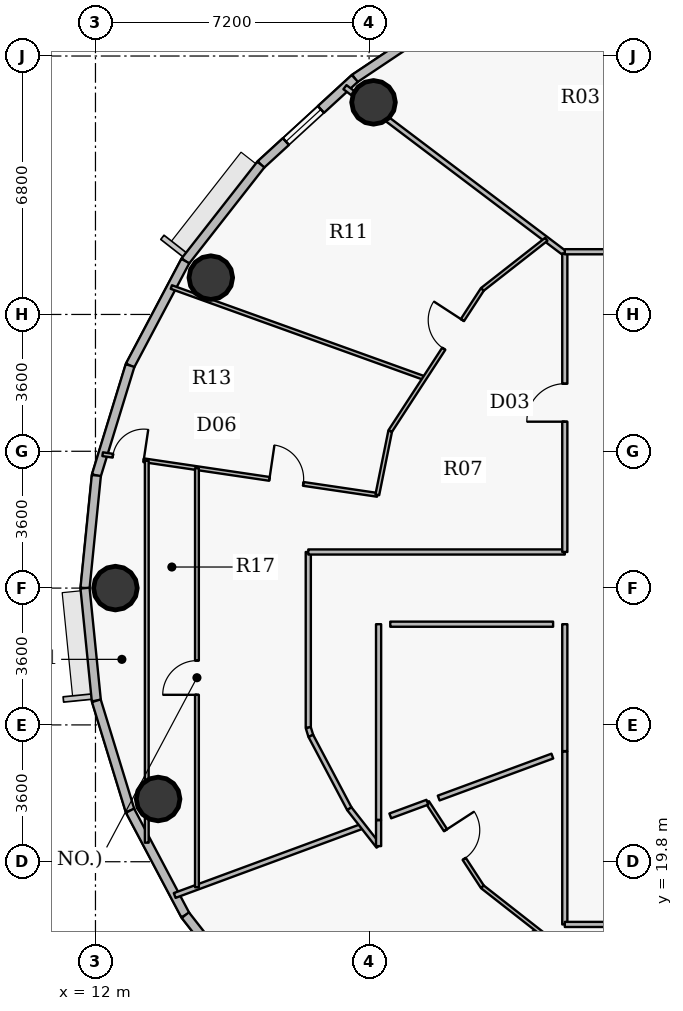
"""IFC4 building model, lengths in metres.
Left out: names, types, materials, properties, quantities, classifications, styles, units other than length and angle.
Written with IfcOpenShell. Run it as: python <this file> out.ifc"""

import sys

from ifc_helpers import new_model, si_unit, direction, frame, frame_2d, origin, origin_2d, place, context, subcontext, project, spatial, rectangle, hollow_circle, extrude, source, transform, mapped, element, fill, save


model = new_model("IFC4")
c1 = context("Model", 3, precision=1e-05, world=origin(), true_north=direction((0.0, 1.0)))
c2 = subcontext(c1, "Body", "Model", "MODEL_VIEW")
j1 = project(units=[si_unit("LENGTHUNIT", "METRE"), si_unit("PLANEANGLEUNIT", "RADIAN")], contexts=[c1])
p1 = place(None, origin())
s1 = spatial("IfcSite", under=j1, at=p1, CompositionType="ELEMENT")
p2 = place(p1, origin())
s2 = spatial("IfcBuilding", under=s1, at=p2, CompositionType="ELEMENT")
p3 = place(p2, frame((0.0, 0.0, 217.8)))
s3 = spatial("IfcBuildingStorey", under=s2, at=p3, CompositionType="ELEMENT", Elevation=217.8)
for number, where, z_axis, x_axis in (
    (1, (19.317, 39.781, 0.0), (0.0, 0.0, 1.0), (1.0, 0.0, 0.0)),
    (2, (15.035, 35.169, 0.0), (0.0, 0.0, 1.0), (1.0, 0.0, 0.0)),
    (3, (12.525, 27.0, 0.0), (0.0, 0.0, 1.0), (1.0, 0.0, 0.0)),
    (4, (13.649, 21.451, 0.0), (0.0, 0.0, 1.0), (1.0, 0.0, 0.0)),
):
    element("IfcColumn", number, at=place(p3, frame(where, z_axis=z_axis, x_axis=x_axis)), inside=s3, PredefinedType="COLUMN", context=c2, shape_type="SweptSolid", body=[
        extrude(hollow_circle(Radius=0.575, WallThickness=0.036, at=origin_2d()), origin(), (0.0, 0.0, 1.0), 3.75),
    ])
p4 = place(p3, frame((18.824, 40.411, 0.0), z_axis=(0.0, 0.0, 1.0), x_axis=(0.831262496074, 0.555880079352, 0.0)))
e5 = element("IfcWall", 5, at=p4, inside=s3, PredefinedType="SOLIDWALL", context=c2, shape_type="SweptSolid", body=[
    extrude(rectangle(XDim=3.484, YDim=0.24, at=frame_2d((1.742, 0.0))), origin(), (0.0, 0.0, 1.0), 3.5),
])
p5 = place(p3, frame((16.352, 38.145, 0.0), z_axis=(0.0, 0.0, 1.0), x_axis=(0.737123922599, 0.675757591694, 0.0)))
e6 = element("IfcWall", 6, at=p5, inside=s3, PredefinedType="SOLIDWALL", context=c2, shape_type="SweptSolid", body=[
    extrude(rectangle(XDim=3.354, YDim=0.24, at=frame_2d((1.677, 0.0))), origin(), (0.0, 0.0, 1.0), 3.5),
])
p6 = place(p5, frame((0.896, 0.0, 0.9)))
e7 = element("IfcOpeningElement", 7, at=p6, cuts=e6, PredefinedType="OPENING", context=c2, shape_type="SweptSolid", body=[
    extrude(rectangle(XDim=1.25, YDim=1.65, at=origin_2d()), frame((0.625, 0.13, 0.825), z_axis=(0.0, -1.0, 0.0), x_axis=(1.0, 0.0, 0.0)), (0.0, 0.0, 1.0), 0.26),
])
p7 = place(p3, frame((14.364, 35.605, 0.0), z_axis=(0.0, 0.0, 1.0), x_axis=(0.616312344705, 0.787501805562, 0.0)))
e8 = element("IfcWall", 8, at=p7, inside=s3, PredefinedType="SOLIDWALL", context=c2, shape_type="SweptSolid", body=[
    extrude(rectangle(XDim=3.225, YDim=0.24, at=frame_2d((1.612, 0.0))), origin(), (0.0, 0.0, 1.0), 3.5),
])
p8 = place(p3, frame((12.91, 32.856, 0.0), z_axis=(0.0, 0.0, 1.0), x_axis=(0.46766049993, 0.883908172157, 0.0)))
e9 = element("IfcWall", 9, at=p8, inside=s3, PredefinedType="SOLIDWALL", context=c2, shape_type="SweptSolid", body=[
    extrude(rectangle(XDim=3.11, YDim=0.24, at=frame_2d((1.555, 0.0))), origin(), (0.0, 0.0, 1.0), 3.5),
])
p9 = place(p3, frame((12.023, 29.964, 0.0), z_axis=(0.0, 0.0, 1.0), x_axis=(0.293132907334, 0.95607170162, 0.0)))
e10 = element("IfcWall", 10, at=p9, inside=s3, PredefinedType="SOLIDWALL", context=c2, shape_type="SweptSolid", body=[
    extrude(rectangle(XDim=3.025, YDim=0.24, at=frame_2d((1.512, 0.0))), origin(), (0.0, 0.0, 1.0), 3.5),
])
for number, where, z_axis, x_axis in (
    (11, (11.725, 27.0, 0.0), (0.0, 0.0, 1.0), (0.1, 0.995, 0.0)),
    (12, (12.023, 24.036, 0.0), (0.0, 0.0, 1.0), (-0.1, 0.995, 0.0)),
):
    element("IfcWall", number, at=place(p3, frame(where, z_axis=z_axis, x_axis=x_axis)), inside=s3, PredefinedType="SOLIDWALL", context=c2, shape_type="SweptSolid", body=[
        extrude(rectangle(XDim=2.979, YDim=0.24, at=frame_2d((1.489, 0.0))), origin(), (0.0, 0.0, 1.0), 3.5),
    ])
p10 = place(p3, frame((12.91, 21.144, 0.0), z_axis=(0.0, 0.0, 1.0), x_axis=(-0.293132907334, 0.95607170162, 0.0)))
e13 = element("IfcWall", 13, at=p10, inside=s3, PredefinedType="SOLIDWALL", context=c2, shape_type="SweptSolid", body=[
    extrude(rectangle(XDim=3.025, YDim=0.24, at=frame_2d((1.512, 0.0))), origin(), (0.0, 0.0, 1.0), 3.5),
])
p11 = place(p3, frame((14.364, 18.395, 0.0), z_axis=(0.0, 0.0, 1.0), x_axis=(-0.46766049993, 0.883908172157, 0.0)))
e14 = element("IfcWall", 14, at=p11, inside=s3, PredefinedType="SOLIDWALL", context=c2, shape_type="SweptSolid", body=[
    extrude(rectangle(XDim=3.11, YDim=0.24, at=frame_2d((1.555, 0.0))), origin(), (0.0, 0.0, 1.0), 3.5),
])
p12 = place(p3, frame((16.352, 15.855, 0.0), z_axis=(0.0, 0.0, 1.0), x_axis=(-0.616312344705, 0.787501805562, 0.0)))
e15 = element("IfcWall", 15, at=p12, inside=s3, PredefinedType="SOLIDWALL", context=c2, shape_type="SweptSolid", body=[
    extrude(rectangle(XDim=3.225, YDim=0.24, at=frame_2d((1.612, 0.0))), origin(), (0.0, 0.0, 1.0), 3.5),
])
p13 = place(p12, frame((0.812, 0.0, 0.9)))
e16 = element("IfcOpeningElement", 16, at=p13, cuts=e15, PredefinedType="OPENING", context=c2, shape_type="SweptSolid", body=[
    extrude(rectangle(XDim=1.6, YDim=1.75, at=origin_2d()), frame((0.8, 0.13, 0.875), z_axis=(0.0, -1.0, 0.0), x_axis=(1.0, 0.0, 0.0)), (0.0, 0.0, 1.0), 0.26),
])
p14 = place(p3, frame((12.189, 30.523, 0.0), z_axis=(0.0, 0.0, 1.0), x_axis=(0.98923000083, -0.146369414352, 0.0)))
e17 = element("IfcWall", 17, at=p14, inside=s3, PredefinedType="PARTITIONING", context=c2, shape_type="SweptSolid", body=[
    extrude(rectangle(XDim=7.306, YDim=0.1, at=frame_2d((3.653, 0.0))), origin(), (0.0, 0.0, 1.0), 2.985),
])
p15 = place(p14, frame((4.437, 0.0, 0.0)))
e18 = element("IfcOpeningElement", 18, at=p15, cuts=e17, PredefinedType="OPENING", context=c2, shape_type="SweptSolid", body=[
    extrude(rectangle(XDim=0.9, YDim=2.1, at=origin_2d()), frame((0.45, 0.06, 1.05), z_axis=(0.0, -1.0, 0.0), x_axis=(1.0, 0.0, 0.0)), (0.0, 0.0, 1.0), 0.12),
])
p16 = place(p14, frame((0.272, 0.0, 0.0)))
e19 = element("IfcOpeningElement", 19, at=p16, cuts=e17, PredefinedType="OPENING", context=c2, shape_type="SweptSolid", body=[
    extrude(rectangle(XDim=0.82, YDim=2.1, at=origin_2d()), frame((0.41, 0.06, 1.05), z_axis=(0.0, -1.0, 0.0), x_axis=(1.0, 0.0, 0.0)), (0.0, 0.0, 1.0), 0.12),
])
p17 = place(p3, frame((13.35, 20.301, 0.0), z_axis=(0.0, 0.0, 1.0), x_axis=(0.0, 1.0, 0.0)))
e20 = element("IfcWall", 20, at=p17, inside=s3, PredefinedType="PARTITIONING", context=c2, shape_type="SweptSolid", body=[
    extrude(rectangle(XDim=10.05, YDim=0.1, at=frame_2d((5.025, 0.0))), origin(), (0.0, 0.0, 1.0), 2.935),
])
p18 = place(p3, frame((13.997, 34.921, 0.0), z_axis=(0.0, 0.0, 1.0), x_axis=(0.940885654064, -0.338724351023, 0.0)))
e21 = element("IfcWall", 21, at=p18, inside=s3, PredefinedType="PARTITIONING", context=c2, shape_type="SweptSolid", body=[
    extrude(rectangle(XDim=7.082, YDim=0.1, at=frame_2d((3.541, 0.0))), origin(), (0.0, 0.0, 1.0), 2.985),
])
p19 = place(p3, frame((14.085, 18.912, 0.0), z_axis=(0.0, 0.0, 1.0), x_axis=(0.938158194698, 0.346206877055, 0.0)))
e22 = element("IfcWall", 22, at=p19, inside=s3, PredefinedType="PARTITIONING", context=c2, shape_type="SweptSolid", body=[
    extrude(rectangle(XDim=5.278, YDim=0.135, at=frame_2d((2.639, 0.0))), origin(), (0.0, 0.0, 1.0), 2.985),
])
p20 = place(p3, frame((14.67, 19.128, 0.0), z_axis=(0.0, 0.0, 1.0), x_axis=(0.0, 1.0, 0.0)))
e23 = element("IfcWall", 23, at=p20, inside=s3, PredefinedType="PARTITIONING", context=c2, shape_type="SweptSolid", body=[
    extrude(rectangle(XDim=11.028, YDim=0.1, at=frame_2d((5.514, 0.0))), origin(), (0.0, 0.0, 1.0), 2.935),
])
p21 = place(p20, frame((5.064, 0.0, 0.0)))
e24 = element("IfcOpeningElement", 24, at=p21, cuts=e23, PredefinedType="OPENING", context=c2, shape_type="SweptSolid", body=[
    extrude(rectangle(XDim=0.9, YDim=2.1, at=origin_2d()), frame((0.45, 0.06, 1.05), z_axis=(0.0, -1.0, 0.0), x_axis=(1.0, 0.0, 0.0)), (0.0, 0.0, 1.0), 0.12),
])
p22 = place(p3, frame((17.6, 23.328, 0.0), z_axis=(0.0, 0.0, 1.0), x_axis=(0.0, 1.0, 0.0)))
e25 = element("IfcWall", 25, at=p22, inside=s3, PredefinedType="PARTITIONING", context=c2, shape_type="SweptSolid", body=[
    extrude(rectangle(XDim=4.622, YDim=0.135, at=frame_2d((2.311, 0.0))), origin(), (0.0, 0.0, 1.0), 2.935),
])
p23 = place(p3, frame((17.6, 23.328, 0.0), z_axis=(0.0, 0.0, 1.0), x_axis=(0.292875000845, -0.956150738053, 0.0)))
e26 = element("IfcWall", 26, at=p23, inside=s3, PredefinedType="PARTITIONING", context=c2, shape_type="SweptSolid", body=[
    extrude(rectangle(XDim=0.227, YDim=0.135, at=frame_2d((0.113, 0.0))), origin(), (0.0, 0.0, 1.0), 3.5),
])
p24 = place(p3, frame((17.6, 27.95, 0.0), z_axis=(0.0, 0.0, 1.0), x_axis=(1.0, 0.0, 0.0)))
e27 = element("IfcWall", 27, at=p24, inside=s3, PredefinedType="PARTITIONING", context=c2, shape_type="SweptSolid", body=[
    extrude(rectangle(XDim=6.75, YDim=0.135, at=frame_2d((3.375, 0.0))), origin(), (0.0, 0.0, 1.0), 3.5),
])
p25 = place(p3, frame((17.667, 23.111, 0.0), z_axis=(0.0, 0.0, 1.0), x_axis=(0.467675622269, -0.883900171024, 0.0)))
e28 = element("IfcWall", 28, at=p25, inside=s3, PredefinedType="PARTITIONING", context=c2, shape_type="SweptSolid", body=[
    extrude(rectangle(XDim=2.168, YDim=0.135, at=frame_2d((1.084, 0.0))), origin(), (0.0, 0.0, 1.0), 2.935),
])
p26 = place(p3, frame((18.268, 14.092, 0.0), z_axis=(0.0, 0.0, 1.0), x_axis=(0.808481640117, 0.588521399436, 0.0)))
e29 = element("IfcWall", 29, at=p26, inside=s3, PredefinedType="PARTITIONING", context=c2, shape_type="SweptSolid", body=[
    extrude(rectangle(XDim=6.641, YDim=0.1, at=frame_2d((3.32, 0.0))), origin(), (0.0, 0.0, 1.0), 2.985),
])
p27 = place(p3, frame((18.565, 40.18, 0.0), z_axis=(0.0, 0.0, 1.0), x_axis=(0.797711861377, -0.603038793295, 0.0)))
e30 = element("IfcWall", 30, at=p27, inside=s3, PredefinedType="PARTITIONING", context=c2, shape_type="SweptSolid", body=[
    extrude(rectangle(XDim=7.252, YDim=0.135, at=frame_2d((3.626, 0.0))), origin(), (0.0, 0.0, 1.0), 2.935),
])
p28 = place(p3, frame((18.681, 21.194, 0.0), z_axis=(0.0, 0.0, 1.0), x_axis=(0.616239706802, -0.787558647823, 0.0)))
e31 = element("IfcWall", 31, at=p28, inside=s3, PredefinedType="PARTITIONING", context=c2, shape_type="SweptSolid", body=[
    extrude(rectangle(XDim=1.248, YDim=0.135, at=frame_2d((0.624, 0.0))), origin(), (0.0, 0.0, 1.0), 3.5),
])
p29 = place(p3, frame((19.416, 29.454, 0.0), z_axis=(0.0, 0.0, 1.0), x_axis=(0.198253557863, 0.980150767379, 0.0)))
e32 = element("IfcWall", 32, at=p29, inside=s3, PredefinedType="PARTITIONING", context=c2, shape_type="SweptSolid", body=[
    extrude(rectangle(XDim=1.713, YDim=0.1, at=frame_2d((0.856, 0.0))), origin(), (0.0, 0.0, 1.0), 3.5),
])
p30 = place(p3, frame((19.45, 20.211, 0.0), z_axis=(0.0, 0.0, 1.0), x_axis=(0.0, 1.0, 0.0)))
e33 = element("IfcWall", 33, at=p30, inside=s3, PredefinedType="PARTITIONING", context=c2, shape_type="SweptSolid", body=[
    extrude(rectangle(XDim=0.681, YDim=0.135, at=frame_2d((0.34, 0.0))), origin(), (0.0, 0.0, 1.0), 3.5),
])
p31 = place(p3, frame((19.756, 31.133, 0.0), z_axis=(0.0, 0.0, 1.0), x_axis=(0.545406924684, 0.83817139447, 0.0)))
e34 = element("IfcWall", 34, at=p31, inside=s3, PredefinedType="PARTITIONING", context=c2, shape_type="SweptSolid", body=[
    extrude(rectangle(XDim=4.448, YDim=0.1, at=frame_2d((2.224, 0.0))), origin(), (0.0, 0.0, 1.0), 2.935),
])
p32 = place(p31, frame((2.583, 0.0, 0.0)))
e35 = element("IfcOpeningElement", 35, at=p32, cuts=e34, PredefinedType="OPENING", context=c2, shape_type="SweptSolid", body=[
    extrude(rectangle(XDim=0.9, YDim=2.1, at=origin_2d()), frame((0.45, 0.06, 1.05), z_axis=(0.0, -1.0, 0.0), x_axis=(1.0, 0.0, 0.0)), (0.0, 0.0, 1.0), 0.12),
])
p33 = place(p3, frame((20.733, 21.366, 0.0), z_axis=(0.0, 0.0, 1.0), x_axis=(0.545375949152, -0.838191549758, 0.0)))
e36 = element("IfcWall", 36, at=p33, inside=s3, PredefinedType="PARTITIONING", context=c2, shape_type="SweptSolid", body=[
    extrude(rectangle(XDim=2.656, YDim=0.1, at=frame_2d((1.328, 0.0))), origin(), (0.0, 0.0, 1.0), 3.5),
])
p34 = place(p33, frame((0.878, 0.0, 0.0)))
e37 = element("IfcOpeningElement", 37, at=p34, cuts=e36, PredefinedType="OPENING", context=c2, shape_type="SweptSolid", body=[
    extrude(rectangle(XDim=0.9, YDim=2.1, at=origin_2d()), frame((0.45, 0.06, 1.05), z_axis=(0.0, -1.0, 0.0), x_axis=(1.0, 0.0, 0.0)), (0.0, 0.0, 1.0), 0.12),
])
p35 = place(p3, frame((22.182, 19.139, 0.0), z_axis=(0.0, 0.0, 1.0), x_axis=(0.787386902975, -0.616459134917, 0.0)))
e38 = element("IfcWall", 38, at=p35, inside=s3, PredefinedType="PARTITIONING", context=c2, shape_type="SweptSolid", body=[
    extrude(rectangle(XDim=4.799, YDim=0.1, at=frame_2d((2.399, 0.0))), origin(), (0.0, 0.0, 1.0), 2.935),
])
p36 = place(p3, frame((22.182, 34.861, 0.0), z_axis=(0.0, 0.0, 1.0), x_axis=(0.787401156588, 0.616440928722, 0.0)))
e39 = element("IfcWall", 39, at=p36, inside=s3, PredefinedType="PARTITIONING", context=c2, shape_type="SweptSolid", body=[
    extrude(rectangle(XDim=2.134, YDim=0.1, at=frame_2d((1.067, 0.0))), origin(), (0.0, 0.0, 1.0), 2.935),
])
p37 = place(p3, frame((24.35, 18.15, 0.0), z_axis=(0.0, 0.0, 1.0), x_axis=(0.0, 1.0, 0.0)))
e40 = element("IfcWall", 40, at=p37, inside=s3, PredefinedType="PARTITIONING", context=c2, shape_type="SweptSolid", body=[
    extrude(rectangle(XDim=4.551, YDim=0.135, at=frame_2d((2.275, 0.0))), origin(), (0.0, 0.0, 1.0), 2.935),
])
p38 = place(p3, frame((24.35, 18.15, 0.0), z_axis=(0.0, 0.0, 1.0), x_axis=(1.0, 0.0, 0.0)))
e41 = element("IfcWall", 41, at=p38, inside=s3, PredefinedType="PARTITIONING", context=c2, shape_type="SweptSolid", body=[
    extrude(rectangle(XDim=23.85, YDim=0.135, at=frame_2d((11.925, 0.0))), origin(), (0.0, 0.0, 1.0), 2.935),
])
p39 = place(p38, frame((2.87, 0.0, 0.0)))
e42 = element("IfcOpeningElement", 42, at=p39, cuts=e41, PredefinedType="OPENING", context=c2, shape_type="SweptSolid", body=[
    extrude(rectangle(XDim=1.0, YDim=2.15, at=origin_2d()), frame((0.5, 0.078, 1.075), z_axis=(0.0, -1.0, 0.0), x_axis=(1.0, 0.0, 0.0)), (0.0, 0.0, 1.0), 0.155),
])
p40 = place(p38, frame((16.13, 0.0, 0.0)))
e43 = element("IfcOpeningElement", 43, at=p40, cuts=e41, PredefinedType="OPENING", context=c2, shape_type="SweptSolid", body=[
    extrude(rectangle(XDim=1.0, YDim=2.15, at=origin_2d()), frame((0.5, 0.078, 1.075), z_axis=(0.0, -1.0, 0.0), x_axis=(1.0, 0.0, 0.0)), (0.0, 0.0, 1.0), 0.155),
])
p41 = place(p3, frame((24.35, 27.95, 0.0), z_axis=(0.0, 0.0, 1.0), x_axis=(0.0, 1.0, 0.0)))
e44 = element("IfcWall", 44, at=p41, inside=s3, PredefinedType="PARTITIONING", context=c2, shape_type="SweptSolid", body=[
    extrude(rectangle(XDim=7.857, YDim=0.135, at=frame_2d((3.929, 0.0))), origin(), (0.0, 0.0, 1.0), 2.935),
])
p42 = place(p41, frame((3.429, 0.0, 0.0)))
e45 = element("IfcOpeningElement", 45, at=p42, cuts=e44, PredefinedType="OPENING", context=c2, shape_type="SweptSolid", body=[
    extrude(rectangle(XDim=1.0, YDim=2.15, at=origin_2d()), frame((0.5, 0.078, 1.075), z_axis=(0.0, -1.0, 0.0), x_axis=(1.0, 0.0, 0.0)), (0.0, 0.0, 1.0), 0.155),
])
p43 = place(p3, frame((24.35, 35.85, 0.0), z_axis=(0.0, 0.0, 1.0), x_axis=(1.0, 0.0, 0.0)))
e46 = element("IfcWall", 46, at=p43, inside=s3, PredefinedType="PARTITIONING", context=c2, shape_type="SweptSolid", body=[
    extrude(rectangle(XDim=26.218, YDim=0.135, at=frame_2d((13.109, 0.0))), origin(), (0.0, 0.0, 1.0), 2.935),
])
p44 = place(p43, frame((21.507, 0.0, 0.0)))
e47 = element("IfcOpeningElement", 47, at=p44, cuts=e46, PredefinedType="OPENING", context=c2, shape_type="SweptSolid", body=[
    extrude(rectangle(XDim=1.0, YDim=2.15, at=origin_2d()), frame((0.5, 0.078, 1.075), z_axis=(0.0, -1.0, 0.0), x_axis=(1.0, 0.0, 0.0)), (0.0, 0.0, 1.0), 0.155),
])
p45 = place(p43, frame((12.95, 0.0, 0.0)))
e48 = element("IfcOpeningElement", 48, at=p45, cuts=e46, PredefinedType="OPENING", context=c2, shape_type="SweptSolid", body=[
    extrude(rectangle(XDim=1.0, YDim=2.15, at=origin_2d()), frame((0.5, 0.078, 1.075), z_axis=(0.0, -1.0, 0.0), x_axis=(1.0, 0.0, 0.0)), (0.0, 0.0, 1.0), 0.155),
])
p46 = place(p43, frame((2.293, 0.0, 0.0)))
e49 = element("IfcOpeningElement", 49, at=p46, cuts=e46, PredefinedType="OPENING", context=c2, shape_type="SweptSolid", body=[
    extrude(rectangle(XDim=1.0, YDim=2.15, at=origin_2d()), frame((0.5, 0.078, 1.075), z_axis=(0.0, -1.0, 0.0), x_axis=(1.0, 0.0, 0.0)), (0.0, 0.0, 1.0), 0.155),
])
p47 = place(p3, frame((19.45, 26.05, 0.0), z_axis=(0.0, 0.0, 1.0), x_axis=(0.0, -1.0, 0.0)))
e50 = element("IfcWall", 50, at=p47, inside=s3, PredefinedType="PARTITIONING", context=c2, shape_type="SweptSolid", body=[
    extrude(rectangle(XDim=5.148, YDim=0.135, at=frame_2d((2.574, 0.0))), origin(), (0.0, 0.0, 1.0), 2.935),
])
p48 = place(p3, frame((24.35, 22.71, 0.0), z_axis=(0.0, 0.0, 1.0), x_axis=(0.0, 1.0, 0.0)))
e51 = element("IfcWall", 51, at=p48, inside=s3, PredefinedType="PARTITIONING", context=c2, shape_type="SweptSolid", body=[
    extrude(rectangle(XDim=3.34, YDim=0.135, at=frame_2d((1.67, 0.0))), origin(), (0.0, 0.0, 1.0), 2.935),
])
p49 = place(p3, frame((24.042, 26.05, 0.0), z_axis=(0.0, 0.0, 1.0), x_axis=(-1.0, 0.0, 0.0)))
e52 = element("IfcWall", 52, at=p49, inside=s3, PredefinedType="PARTITIONING", context=c2, shape_type="SweptSolid", body=[
    extrude(rectangle(XDim=4.285, YDim=0.135, at=frame_2d((2.143, 0.0))), origin(), (0.0, 0.0, 1.0), 3.5),
])
p50 = place(p3, frame((21.031, 21.476, 0.0), z_axis=(0.0, 0.0, 1.0), x_axis=(0.938166504217, 0.346184358926, 0.0)))
e53 = element("IfcWall", 53, at=p50, inside=s3, PredefinedType="PARTITIONING", context=c2, shape_type="SweptSolid", body=[
    extrude(rectangle(XDim=3.188, YDim=0.135, at=frame_2d((1.594, 0.0))), origin(), (0.0, 0.0, 1.0), 3.5),
])
p51 = place(p3, frame((19.758, 21.006, 0.0), z_axis=(0.0, 0.0, 1.0), x_axis=(0.938130503792, 0.346281905179, 0.0)))
e54 = element("IfcWall", 54, at=p51, inside=s3, PredefinedType="PARTITIONING", context=c2, shape_type="SweptSolid", body=[
    extrude(rectangle(XDim=1.04, YDim=0.135, at=frame_2d((0.52, 0.0))), origin(), (0.0, 0.0, 1.0), 3.5),
])
m1 = source(origin(), c2, "Body", "SweptSolid", [
    extrude(rectangle(XDim=1.25, YDim=1.65, at=origin_2d()), frame((0.625, 0.03, 0.825), z_axis=(0.0, -1.0, 0.0), x_axis=(1.0, 0.0, 0.0)), (0.0, 0.0, 1.0), 0.06),
])
p52 = place(p6, origin())
e55 = element("IfcWindow", 55, at=p52, inside=s3, PartitioningType="SINGLE_PANEL", PredefinedType="WINDOW", context=c2, shape_type="MappedRepresentation", body=[
    mapped(m1, transform((0.0, 0.0, 0.0), x_axis=(1.0, 0.0, 0.0), y_axis=(0.0, 1.0, 0.0), z_axis=(0.0, 0.0, 1.0), scale=1.0)),
])
fill(e7, e55)
m2 = source(origin(), c2, "Body", "SweptSolid", [
    extrude(rectangle(XDim=1.0, YDim=2.15, at=origin_2d()), frame((0.5, 0.025, 1.075), z_axis=(0.0, -1.0, 0.0), x_axis=(1.0, 0.0, 0.0)), (0.0, 0.0, 1.0), 0.05),
])
p53 = place(p42, origin())
e56 = element("IfcDoor", 56, at=p53, inside=s3, OperationType="SINGLE_SWING_LEFT", PredefinedType="DOOR", context=c2, shape_type="MappedRepresentation", body=[
    mapped(m2, transform((0.0, 0.0, 0.0), x_axis=(1.0, 0.0, 0.0), y_axis=(0.0, 1.0, 0.0), z_axis=(0.0, 0.0, 1.0), scale=1.0)),
])
fill(e45, e56)
m3 = source(origin(), c2, "Body", "SweptSolid", [
    extrude(rectangle(XDim=0.9, YDim=2.1, at=origin_2d()), frame((0.45, 0.025, 1.05), z_axis=(0.0, -1.0, 0.0), x_axis=(1.0, 0.0, 0.0)), (0.0, 0.0, 1.0), 0.05),
])
p54 = place(p32, origin())
e57 = element("IfcDoor", 57, at=p54, inside=s3, OperationType="SINGLE_SWING_RIGHT", PredefinedType="DOOR", context=c2, shape_type="MappedRepresentation", body=[
    mapped(m3, transform((0.0, 0.0, 0.0), x_axis=(1.0, 0.0, 0.0), y_axis=(0.0, 1.0, 0.0), z_axis=(0.0, 0.0, 1.0), scale=1.0)),
])
fill(e35, e57)
p55 = place(p15, origin())
e58 = element("IfcDoor", 58, at=p55, inside=s3, OperationType="SINGLE_SWING_LEFT", PredefinedType="DOOR", context=c2, shape_type="MappedRepresentation", body=[
    mapped(m3, transform((0.0, 0.0, 0.0), x_axis=(1.0, 0.0, 0.0), y_axis=(0.0, 1.0, 0.0), z_axis=(0.0, 0.0, 1.0), scale=1.0)),
])
fill(e18, e58)
m4 = source(origin(), c2, "Body", "SweptSolid", [
    extrude(rectangle(XDim=0.82, YDim=2.1, at=origin_2d()), frame((0.41, 0.025, 1.05), z_axis=(0.0, -1.0, 0.0), x_axis=(1.0, 0.0, 0.0)), (0.0, 0.0, 1.0), 0.05),
])
p56 = place(p16, origin())
e59 = element("IfcDoor", 59, at=p56, inside=s3, OperationType="SINGLE_SWING_RIGHT", PredefinedType="DOOR", context=c2, shape_type="MappedRepresentation", body=[
    mapped(m4, transform((0.0, 0.0, 0.0), x_axis=(1.0, 0.0, 0.0), y_axis=(0.0, 1.0, 0.0), z_axis=(0.0, 0.0, 1.0), scale=1.0)),
])
fill(e19, e59)
p57 = place(p21, origin())
e60 = element("IfcDoor", 60, at=p57, inside=s3, OperationType="SINGLE_SWING_LEFT", PredefinedType="DOOR", context=c2, shape_type="MappedRepresentation", body=[
    mapped(m3, transform((0.0, 0.0, 0.0), x_axis=(1.0, 0.0, 0.0), y_axis=(0.0, 1.0, 0.0), z_axis=(0.0, 0.0, 1.0), scale=1.0)),
])
fill(e24, e60)
p58 = place(p34, origin())
e61 = element("IfcDoor", 61, at=p58, inside=s3, OperationType="SINGLE_SWING_LEFT", PredefinedType="DOOR", context=c2, shape_type="MappedRepresentation", body=[
    mapped(m3, transform((0.0, 0.0, 0.0), x_axis=(1.0, 0.0, 0.0), y_axis=(0.0, 1.0, 0.0), z_axis=(0.0, 0.0, 1.0), scale=1.0)),
])
fill(e37, e61)
save(model, sys.argv[1])
